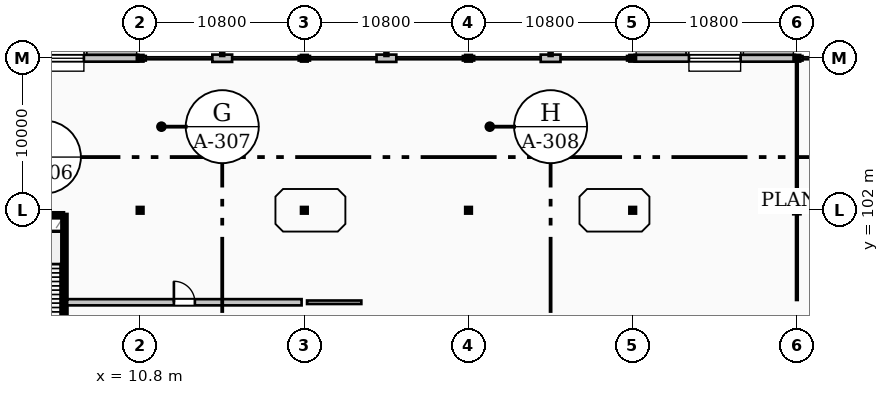
"""IFC4 building model, lengths in metres.
Left out: names, types, materials, properties, quantities, classifications, styles, units other than length and angle.
Written with IfcOpenShell. Run it as: python <this file> out.ifc"""

import sys

from ifc_helpers import new_model, si_unit, direction, frame, frame_2d, origin, origin_2d, place, context, subcontext, project, spatial, rectangle, hollow_rectangle, i_section, extrude, element, fill, save


model = new_model("IFC4")
c1 = context("Model", 3, precision=1e-05, world=origin(), true_north=direction((0.0, 1.0)))
c2 = subcontext(c1, "Body", "Model", "MODEL_VIEW")
j1 = project(units=[si_unit("LENGTHUNIT", "METRE"), si_unit("PLANEANGLEUNIT", "RADIAN")], contexts=[c1])
p1 = place(None, origin())
s1 = spatial("IfcSite", under=j1, at=p1, CompositionType="ELEMENT")
p2 = place(p1, origin())
s2 = spatial("IfcBuilding", under=s1, at=p2, CompositionType="ELEMENT")
p3 = place(p2, frame((0.0, 0.0, 14.4)))
s3 = spatial("IfcBuildingStorey", under=s2, at=p3, CompositionType="ELEMENT", Elevation=14.4)
for number, where, z_axis, x_axis in (
    (1, (10.8, 102.0, 0.0), (0.0, 0.0, 1.0), (1.0, 0.0, 0.0)),
    (2, (10.8, 112.0, 0.0), (0.0, 0.0, 1.0), (1.0, 0.0, 0.0)),
    (3, (21.6, 102.0, 0.0), (0.0, 0.0, 1.0), (1.0, 0.0, 0.0)),
    (4, (21.6, 112.0, 0.0), (0.0, 0.0, 1.0), (1.0, 0.0, 0.0)),
    (5, (32.4, 102.0, 0.0), (0.0, 0.0, 1.0), (1.0, 0.0, 0.0)),
    (6, (32.4, 112.0, 0.0), (0.0, 0.0, 1.0), (1.0, 0.0, 0.0)),
    (7, (43.2, 102.0, 0.0), (0.0, 0.0, 1.0), (1.0, 0.0, 0.0)),
    (8, (43.2, 112.0, 0.0), (0.0, 0.0, 1.0), (1.0, 0.0, 0.0)),
):
    element("IfcColumn", number, at=place(p3, frame(where, z_axis=z_axis, x_axis=x_axis)), inside=s3, PredefinedType="COLUMN", context=c2, shape_type="SweptSolid", body=[
        extrude(hollow_rectangle(XDim=0.26, YDim=0.26, WallThickness=0.014, InnerFilletRadius=0.014, OuterFilletRadius=0.028, at=origin_2d()), origin(), (0.0, 0.0, 1.0), 9.6),
    ])
p4 = place(p3, frame((54.0, 102.0, 0.0), z_axis=(0.0, 0.0, 1.0), x_axis=(1.0, 0.0, 0.0)))
e9 = element("IfcColumn", 9, at=p4, inside=s3, PredefinedType="COLUMN", context=c2, shape_type="SweptSolid", body=[
    extrude(i_section(OverallWidth=0.3, OverallDepth=0.35, WebThickness=0.01, FlangeThickness=0.018, FilletRadius=0.027, at=origin_2d()), origin(), (0.0, 0.0, 1.0), 9.6),
])
p5 = place(p3, frame((54.0, 112.0, 0.0), z_axis=(0.0, 0.0, 1.0), x_axis=(1.0, 0.0, 0.0)))
e10 = element("IfcColumn", 10, at=p5, inside=s3, PredefinedType="COLUMN", context=c2, shape_type="SweptSolid", body=[
    extrude(hollow_rectangle(XDim=0.26, YDim=0.26, WallThickness=0.014, InnerFilletRadius=0.014, OuterFilletRadius=0.028, at=origin_2d()), origin(), (0.0, 0.0, 1.0), 9.6),
])
p6 = place(p3, frame((54.37, 112.0, 0.0), z_axis=(0.0, 0.0, 1.0), x_axis=(-1.0, 0.0, 0.0)))
e11 = element("IfcWall", 11, at=p6, inside=s3, PredefinedType="STANDARD", context=c2, shape_type="SweptSolid", body=[
    extrude(rectangle(XDim=0.244, YDim=0.3, at=frame_2d((0.122, 0.0))), origin(), (0.0, 0.0, 1.0), 9.36),
])
p7 = place(p3, frame((53.874, 112.0, 0.0), z_axis=(0.0, 0.0, 1.0), x_axis=(-1.0, 0.0, 0.0)))
e12 = element("IfcWall", 12, at=p7, inside=s3, PredefinedType="STANDARD", context=c2, shape_type="SweptSolid", body=[
    extrude(rectangle(XDim=10.548, YDim=0.45, at=frame_2d((5.274, 0.0))), origin(), (0.0, 0.0, 1.0), 8.92),
])
p8 = place(p7, frame((3.574, 0.0, 1.1)))
e13 = element("IfcOpeningElement", 13, at=p8, cuts=e12, PredefinedType="OPENING", context=c2, shape_type="SweptSolid", body=[
    extrude(rectangle(XDim=3.4, YDim=5.8, at=frame_2d((1.7, 2.9))), frame((0.0, 0.235, 0.0), z_axis=(0.0, -1.0, 0.0), x_axis=(1.0, 0.0, 0.0)), (0.0, 0.0, 1.0), 0.47),
])
p9 = place(p3, frame((38.45, 112.0, 0.0), z_axis=(0.0, 0.0, 1.0), x_axis=(-1.0, 0.0, 0.0)))
e14 = element("IfcWall", 14, at=p9, inside=s3, PredefinedType="STANDARD", context=c2, shape_type="SweptSolid", body=[
    extrude(rectangle(XDim=1.3, YDim=0.48, at=frame_2d((0.65, 0.0))), origin(), (0.0, 0.0, 1.0), 8.92),
])
p10 = place(p3, frame((43.074, 112.0, 0.0), z_axis=(0.0, 0.0, 1.0), x_axis=(-1.0, 0.0, 0.0)))
e15 = element("IfcWall", 15, at=p10, inside=s3, PredefinedType="STANDARD", context=c2, shape_type="SweptSolid", body=[
    extrude(rectangle(XDim=0.244, YDim=0.3, at=frame_2d((0.122, 0.0))), origin(), (0.0, 0.0, 1.0), 9.36),
])
p11 = place(p3, frame((32.77, 112.0, 0.0), z_axis=(0.0, 0.0, 1.0), x_axis=(-1.0, 0.0, 0.0)))
e16 = element("IfcWall", 16, at=p11, inside=s3, PredefinedType="STANDARD", context=c2, shape_type="SweptSolid", body=[
    extrude(rectangle(XDim=0.244, YDim=0.3, at=frame_2d((0.122, 0.0))), origin(), (0.0, 0.0, 1.0), 9.36),
])
p12 = place(p3, frame((27.65, 112.0, 0.0), z_axis=(0.0, 0.0, 1.0), x_axis=(-1.0, 0.0, 0.0)))
e17 = element("IfcWall", 17, at=p12, inside=s3, PredefinedType="STANDARD", context=c2, shape_type="SweptSolid", body=[
    extrude(rectangle(XDim=1.3, YDim=0.48, at=frame_2d((0.65, 0.0))), origin(), (0.0, 0.0, 1.0), 8.92),
])
for number, where, z_axis, x_axis in (
    (18, (32.274, 112.0, 0.0), (0.0, 0.0, 1.0), (-1.0, 0.0, 0.0)),
    (19, (21.97, 112.0, 0.0), (0.0, 0.0, 1.0), (-1.0, 0.0, 0.0)),
):
    element("IfcWall", number, at=place(p3, frame(where, z_axis=z_axis, x_axis=x_axis)), inside=s3, PredefinedType="STANDARD", context=c2, shape_type="SweptSolid", body=[
        extrude(rectangle(XDim=0.244, YDim=0.3, at=frame_2d((0.122, 0.0))), origin(), (0.0, 0.0, 1.0), 9.36),
    ])
p13 = place(p3, frame((16.85, 112.0, 0.0), z_axis=(0.0, 0.0, 1.0), x_axis=(-1.0, 0.0, 0.0)))
e20 = element("IfcWall", 20, at=p13, inside=s3, PredefinedType="STANDARD", context=c2, shape_type="SweptSolid", body=[
    extrude(rectangle(XDim=1.3, YDim=0.48, at=frame_2d((0.65, 0.0))), origin(), (0.0, 0.0, 1.0), 8.92),
])
p14 = place(p3, frame((21.474, 112.0, 0.0), z_axis=(0.0, 0.0, 1.0), x_axis=(-1.0, 0.0, 0.0)))
e21 = element("IfcWall", 21, at=p14, inside=s3, PredefinedType="STANDARD", context=c2, shape_type="SweptSolid", body=[
    extrude(rectangle(XDim=0.244, YDim=0.3, at=frame_2d((0.122, 0.0))), origin(), (0.0, 0.0, 1.0), 9.36),
])
p15 = place(p3, frame((11.17, 112.0, 0.0), z_axis=(0.0, 0.0, 1.0), x_axis=(-1.0, 0.0, 0.0)))
e22 = element("IfcWall", 22, at=p15, inside=s3, PredefinedType="STANDARD", context=c2, shape_type="SweptSolid", body=[
    extrude(rectangle(XDim=0.244, YDim=0.3, at=frame_2d((0.122, 0.0))), origin(), (0.0, 0.0, 1.0), 9.36),
])
p16 = place(p3, frame((10.674, 112.0, 0.0), z_axis=(0.0, 0.0, 1.0), x_axis=(-1.0, 0.0, 0.0)))
e23 = element("IfcWall", 23, at=p16, inside=s3, PredefinedType="STANDARD", context=c2, shape_type="SweptSolid", body=[
    extrude(rectangle(XDim=10.548, YDim=0.45, at=frame_2d((5.274, 0.0))), origin(), (0.0, 0.0, 1.0), 8.92),
])
p17 = place(p16, frame((3.574, 0.0, 1.1)))
e24 = element("IfcOpeningElement", 24, at=p17, cuts=e23, PredefinedType="OPENING", context=c2, shape_type="SweptSolid", body=[
    extrude(rectangle(XDim=3.4, YDim=5.8, at=frame_2d((1.7, 2.9))), frame((0.0, 0.235, 0.0), z_axis=(0.0, -1.0, 0.0), x_axis=(1.0, 0.0, 0.0)), (0.0, 0.0, 1.0), 0.47),
])
p18 = place(p3, frame((5.82, 92.53, 0.0), z_axis=(0.0, 0.0, 1.0), x_axis=(0.0, 1.0, 0.0)))
e25 = element("IfcWall", 25, at=p18, inside=s3, PredefinedType="SHEAR", context=c2, shape_type="SweptSolid", body=[
    extrude(rectangle(XDim=9.14, YDim=0.22, at=frame_2d((4.57, 0.0))), origin(), (0.0, 0.0, 1.0), 9.36),
])
p19 = place(p3, frame((1.3, 101.67, 0.0), z_axis=(0.0, 0.0, 1.0), x_axis=(1.0, 0.0, 0.0)))
e26 = element("IfcWall", 26, at=p19, inside=s3, PredefinedType="SHEAR", context=c2, shape_type="SweptSolid", body=[
    extrude(rectangle(XDim=4.4, YDim=0.22, at=frame_2d((2.2, 0.0))), origin(), (0.0, 0.0, 1.0), 9.36),
])
p20 = place(p3, frame((6.0, 95.95, 0.0), z_axis=(0.0, 0.0, 1.0), x_axis=(1.0, 0.0, 0.0)))
e27 = element("IfcWall", 27, at=p20, inside=s3, PredefinedType="PARTITIONING", context=c2, shape_type="SweptSolid", body=[
    extrude(rectangle(XDim=15.42, YDim=0.41, at=frame_2d((7.71, 0.0))), origin(), (0.0, 0.0, 1.0), 9.32),
])
p21 = place(p20, frame((7.02, 0.0, 0.0)))
e28 = element("IfcOpeningElement", 28, at=p21, cuts=e27, PredefinedType="OPENING", context=c2, shape_type="SweptSolid", body=[
    extrude(rectangle(XDim=1.38, YDim=2.38, at=frame_2d((0.69, 1.19))), frame((0.0, 0.215, 0.0), z_axis=(0.0, -1.0, 0.0), x_axis=(1.0, 0.0, 0.0)), (0.0, 0.0, 1.0), 0.43),
])
p22 = place(p3, frame((21.78, 95.95, 0.0), z_axis=(0.0, 0.0, 1.0), x_axis=(1.0, 0.0, 0.0)))
e29 = element("IfcWall", 29, at=p22, inside=s3, PredefinedType="PARTITIONING", context=c2, shape_type="SweptSolid", body=[
    extrude(rectangle(XDim=3.57, YDim=0.23, at=frame_2d((1.785, 0.0))), origin(), (0.0, 0.0, 1.0), 9.32),
])
p23 = place(p3, frame((54.0, 96.1, 0.0), z_axis=(0.0, 0.0, 1.0), x_axis=(0.0, 1.0, 0.0)))
e30 = element("IfcWall", 30, at=p23, inside=s3, PredefinedType="PARTITIONING", context=c2, shape_type="SweptSolid", body=[
    extrude(rectangle(XDim=5.7, YDim=0.11, at=frame_2d((2.85, 0.0))), origin(), (0.0, 0.0, 1.0), 8.86),
])
p24 = place(p3, frame((54.0, 102.2, 0.0), z_axis=(0.0, 0.0, 1.0), x_axis=(0.0, 1.0, 0.0)))
e31 = element("IfcWall", 31, at=p24, inside=s3, PredefinedType="PARTITIONING", context=c2, shape_type="SweptSolid", body=[
    extrude(rectangle(XDim=9.62, YDim=0.11, at=frame_2d((4.81, 0.0))), origin(), (0.0, 0.0, 1.0), 8.86),
])
p25 = place(p8, origin())
e32 = element("IfcWindow", 32, at=p25, inside=s3, PartitioningType="SINGLE_PANEL", PredefinedType="WINDOW", context=c2, shape_type="SweptSolid", body=[
    extrude(rectangle(XDim=3.4, YDim=5.8, at=frame_2d((1.7, 2.9))), frame((0.0, 0.03, 0.0), z_axis=(0.0, -1.0, 0.0), x_axis=(1.0, 0.0, 0.0)), (0.0, 0.0, 1.0), 0.06),
])
fill(e13, e32)
p26 = place(p17, origin())
e33 = element("IfcWindow", 33, at=p26, inside=s3, PartitioningType="SINGLE_PANEL", PredefinedType="WINDOW", context=c2, shape_type="SweptSolid", body=[
    extrude(rectangle(XDim=3.4, YDim=5.8, at=frame_2d((1.7, 2.9))), frame((0.0, 0.03, 0.0), z_axis=(0.0, -1.0, 0.0), x_axis=(1.0, 0.0, 0.0)), (0.0, 0.0, 1.0), 0.06),
])
fill(e24, e33)
p27 = place(p21, origin())
e34 = element("IfcDoor", 34, at=p27, inside=s3, OperationType="SINGLE_SWING_LEFT", PredefinedType="DOOR", context=c2, shape_type="SweptSolid", body=[
    extrude(rectangle(XDim=1.38, YDim=2.38, at=frame_2d((0.69, 1.19))), frame((0.0, 0.025, 0.0), z_axis=(0.0, -1.0, 0.0), x_axis=(1.0, 0.0, 0.0)), (0.0, 0.0, 1.0), 0.05),
])
fill(e28, e34)
save(model, sys.argv[1])
